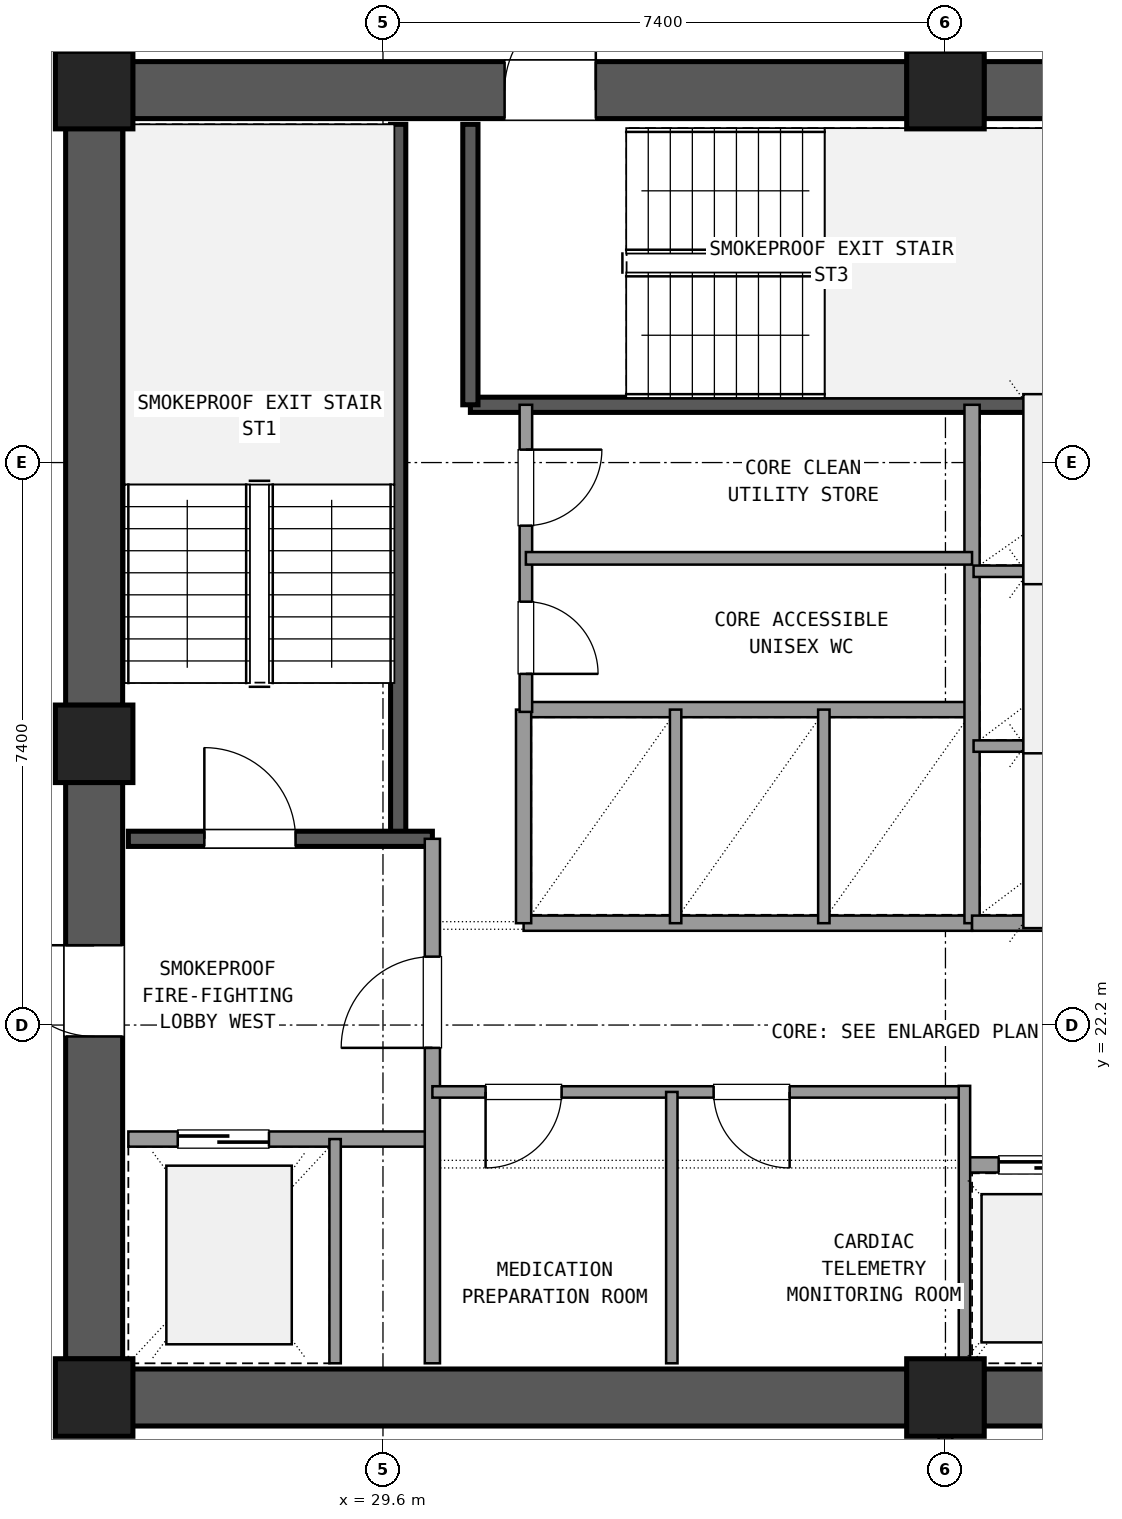
"""IFC4 building model, lengths in metres.
Left out: names, types, materials, properties, quantities, classifications, styles, units other than length and angle.
Written with IfcOpenShell. Run it as: python <this file> out.ifc"""

import sys

from ifc_helpers import new_model, si_unit, direction, frame, frame_2d, origin, origin_2d, place, context, subcontext, project, spatial, rectangle, extrude, element, fill, save


model = new_model("IFC4")
c1 = context("Model", 3, precision=1e-05, world=origin(), true_north=direction((0.0, 1.0)))
c2 = subcontext(c1, "Body", "Model", "MODEL_VIEW")
j1 = project(units=[si_unit("LENGTHUNIT", "METRE"), si_unit("PLANEANGLEUNIT", "RADIAN")], contexts=[c1])
p1 = place(None, origin())
s1 = spatial("IfcSite", under=j1, at=p1, CompositionType="ELEMENT")
p2 = place(p1, origin())
s2 = spatial("IfcBuilding", under=s1, at=p2, CompositionType="ELEMENT")
p3 = place(p2, frame((0.0, 0.0, 102.78)))
s3 = spatial("IfcBuildingStorey", under=s2, at=p3, CompositionType="ELEMENT", Elevation=102.78)
for number, where, z_axis, x_axis in (
    (1, (25.8, 17.3, 0.0), (0.0, 0.0, 1.0), (1.0, 0.0, 0.0)),
    (2, (37.0, 17.3, 0.0), (0.0, 0.0, 1.0), (1.0, 0.0, 0.0)),
    (3, (37.0, 34.5, 0.0), (0.0, 0.0, 1.0), (1.0, 0.0, 0.0)),
    (4, (25.8, 34.5, 0.0), (0.0, 0.0, 1.0), (1.0, 0.0, 0.0)),
    (5, (25.8, 25.9, 0.0), (0.0, 0.0, 1.0), (1.0, 0.0, 0.0)),
):
    element("IfcColumn", number, at=place(p3, frame(where, z_axis=z_axis, x_axis=x_axis)), inside=s3, PredefinedType="COLUMN", context=c2, shape_type="SweptSolid", body=[
        extrude(rectangle(XDim=1.02, YDim=1.02, at=origin_2d()), origin(), (0.0, 0.0, 1.0), 3.6),
    ])
for number, where, z_axis, x_axis in (
    (6, (26.305, 17.3, 0.0), (0.0, 0.0, 1.0), (1.0, 0.0, 0.0)),
    (7, (37.505, 17.3, 0.0), (0.0, 0.0, 1.0), (1.0, 0.0, 0.0)),
):
    element("IfcWall", number, at=place(p3, frame(where, z_axis=z_axis, x_axis=x_axis)), inside=s3, PredefinedType="SHEAR", context=c2, shape_type="SweptSolid", body=[
        extrude(rectangle(XDim=10.19, YDim=0.75, at=frame_2d((5.095, 0.0))), origin(), (0.0, 0.0, 1.0), 3.32),
    ])
p4 = place(p3, frame((47.695, 34.5, 0.0), z_axis=(0.0, 0.0, 1.0), x_axis=(-1.0, 0.0, 0.0)))
e8 = element("IfcWall", 8, at=p4, inside=s3, PredefinedType="SHEAR", context=c2, shape_type="SweptSolid", body=[
    extrude(rectangle(XDim=10.19, YDim=0.75, at=frame_2d((5.095, 0.0))), origin(), (0.0, 0.0, 1.0), 3.32),
])
p5 = place(p4, frame((4.595, 0.0, 0.0)))
e9 = element("IfcOpeningElement", 9, at=p5, cuts=e8, PredefinedType="OPENING", context=c2, shape_type="SweptSolid", body=[
    extrude(rectangle(XDim=1.6, YDim=2.2, at=frame_2d((0.8, 1.1))), frame((0.0, 0.385, 0.0), z_axis=(0.0, -1.0, 0.0), x_axis=(1.0, 0.0, 0.0)), (0.0, 0.0, 1.0), 0.77),
])
p6 = place(p3, frame((36.495, 34.5, 0.0), z_axis=(0.0, 0.0, 1.0), x_axis=(-1.0, 0.0, 0.0)))
e10 = element("IfcWall", 10, at=p6, inside=s3, PredefinedType="SHEAR", context=c2, shape_type="SweptSolid", body=[
    extrude(rectangle(XDim=10.19, YDim=0.75, at=frame_2d((5.095, 0.0))), origin(), (0.0, 0.0, 1.0), 3.32),
])
p7 = place(p6, frame((4.095, 0.0, 0.0)))
e11 = element("IfcOpeningElement", 11, at=p7, cuts=e10, PredefinedType="OPENING", context=c2, shape_type="SweptSolid", body=[
    extrude(rectangle(XDim=1.2, YDim=2.15, at=frame_2d((0.6, 1.075))), frame((0.0, 0.385, 0.0), z_axis=(0.0, -1.0, 0.0), x_axis=(1.0, 0.0, 0.0)), (0.0, 0.0, 1.0), 0.77),
])
p8 = place(p3, frame((25.8, 33.995, 0.0), z_axis=(0.0, 0.0, 1.0), x_axis=(0.0, -1.0, 0.0)))
e12 = element("IfcWall", 12, at=p8, inside=s3, PredefinedType="SHEAR", context=c2, shape_type="SweptSolid", body=[
    extrude(rectangle(XDim=7.59, YDim=0.75, at=frame_2d((3.795, 0.0))), origin(), (0.0, 0.0, 1.0), 3.32),
])
p9 = place(p3, frame((25.8, 25.395, 0.0), z_axis=(0.0, 0.0, 1.0), x_axis=(0.0, -1.0, 0.0)))
e13 = element("IfcWall", 13, at=p9, inside=s3, PredefinedType="SHEAR", context=c2, shape_type="SweptSolid", body=[
    extrude(rectangle(XDim=7.59, YDim=0.75, at=frame_2d((3.795, 0.0))), origin(), (0.0, 0.0, 1.0), 3.32),
])
p10 = place(p9, frame((2.145, 0.0, 0.0)))
e14 = element("IfcOpeningElement", 14, at=p10, cuts=e13, PredefinedType="OPENING", context=c2, shape_type="SweptSolid", body=[
    extrude(rectangle(XDim=1.2, YDim=2.15, at=frame_2d((0.6, 1.075))), frame((0.0, 0.385, 0.0), z_axis=(0.0, -1.0, 0.0), x_axis=(1.0, 0.0, 0.0)), (0.0, 0.0, 1.0), 0.77),
])
p11 = place(p3, frame((29.8, 24.65, 0.0), z_axis=(0.0, 0.0, 1.0), x_axis=(0.0, 1.0, 0.0)))
e15 = element("IfcWall", 15, at=p11, inside=s3, PredefinedType="SHEAR", context=c2, shape_type="SweptSolid", body=[
    extrude(rectangle(XDim=9.4, YDim=0.2, at=frame_2d((4.7, 0.0))), origin(), (0.0, 0.0, 1.0), 3.32),
])
p12 = place(p3, frame((26.25, 24.65, 0.0), z_axis=(0.0, 0.0, 1.0), x_axis=(1.0, 0.0, 0.0)))
e16 = element("IfcWall", 16, at=p12, inside=s3, PredefinedType="SHEAR", context=c2, shape_type="SweptSolid", body=[
    extrude(rectangle(XDim=4.0, YDim=0.2, at=frame_2d((2.0, 0.0))), origin(), (0.0, 0.0, 1.0), 3.32),
])
p13 = place(p12, frame((1.0, 0.0, 0.0)))
e17 = element("IfcOpeningElement", 17, at=p13, cuts=e16, PredefinedType="OPENING", context=c2, shape_type="SweptSolid", body=[
    extrude(rectangle(XDim=1.2, YDim=2.15, at=frame_2d((0.6, 1.075))), frame((0.0, 0.11, 0.0), z_axis=(0.0, -1.0, 0.0), x_axis=(1.0, 0.0, 0.0)), (0.0, 0.0, 1.0), 0.22),
])
p14 = place(p3, frame((30.75, 30.36, 0.0), z_axis=(0.0, 0.0, 1.0), x_axis=(1.0, 0.0, 0.0)))
e18 = element("IfcWall", 18, at=p14, inside=s3, PredefinedType="SHEAR", context=c2, shape_type="SweptSolid", body=[
    extrude(rectangle(XDim=9.5, YDim=0.2, at=frame_2d((4.75, 0.0))), origin(), (0.0, 0.0, 1.0), 3.32),
])
p15 = place(p3, frame((30.75, 30.36, 0.0), z_axis=(0.0, 0.0, 1.0), x_axis=(0.0, 1.0, 0.0)))
e19 = element("IfcWall", 19, at=p15, inside=s3, PredefinedType="SHEAR", context=c2, shape_type="SweptSolid", body=[
    extrude(rectangle(XDim=3.69, YDim=0.2, at=frame_2d((1.845, 0.0))), origin(), (0.0, 0.0, 1.0), 3.32),
])
p16 = place(p3, frame((26.25, 20.7, 0.0), z_axis=(0.0, 0.0, 1.0), x_axis=(1.0, 0.0, 0.0)))
e20 = element("IfcWall", 20, at=p16, inside=s3, PredefinedType="SOLIDWALL", context=c2, shape_type="SweptSolid", body=[
    extrude(rectangle(XDim=4.0, YDim=0.2, at=frame_2d((2.0, 0.0))), origin(), (0.0, 0.0, 1.0), 2.61),
])
p17 = place(p16, frame((0.65, 0.0, 0.0)))
e21 = element("IfcOpeningElement", 21, at=p17, cuts=e20, PredefinedType="OPENING", context=c2, shape_type="SweptSolid", body=[
    extrude(rectangle(XDim=1.2, YDim=2.15, at=frame_2d((0.6, 1.075))), frame((0.0, 0.11, 0.0), z_axis=(0.0, -1.0, 0.0), x_axis=(1.0, 0.0, 0.0)), (0.0, 0.0, 1.0), 0.22),
])
p18 = place(p3, frame((30.25, 17.75, 0.0), z_axis=(0.0, 0.0, 1.0), x_axis=(0.0, 1.0, 0.0)))
e22 = element("IfcWall", 22, at=p18, inside=s3, PredefinedType="SOLIDWALL", context=c2, shape_type="SweptSolid", body=[
    extrude(rectangle(XDim=6.9, YDim=0.2, at=frame_2d((3.45, 0.0))), origin(), (0.0, 0.0, 1.0), 2.61),
])
p19 = place(p18, frame((4.15, 0.0, 0.0)))
e23 = element("IfcOpeningElement", 23, at=p19, cuts=e22, PredefinedType="OPENING", context=c2, shape_type="SweptSolid", body=[
    extrude(rectangle(XDim=1.2, YDim=2.15, at=frame_2d((0.6, 1.075))), frame((0.0, 0.11, 0.0), z_axis=(0.0, -1.0, 0.0), x_axis=(1.0, 0.0, 0.0)), (0.0, 0.0, 1.0), 0.22),
])
p20 = place(p3, frame((28.97, 17.75, 0.0), z_axis=(0.0, 0.0, 1.0), x_axis=(0.0, 1.0, 0.0)))
e24 = element("IfcWall", 24, at=p20, inside=s3, PredefinedType="PARTITIONING", context=c2, shape_type="SweptSolid", body=[
    extrude(rectangle(XDim=2.95, YDim=0.15, at=frame_2d((1.475, 0.0))), origin(), (0.0, 0.0, 1.0), 2.61),
])
p21 = place(p3, frame((30.25, 21.32, 0.0), z_axis=(0.0, 0.0, 1.0), x_axis=(1.0, 0.0, 0.0)))
e25 = element("IfcWall", 25, at=p21, inside=s3, PredefinedType="PARTITIONING", context=c2, shape_type="SweptSolid", body=[
    extrude(rectangle(XDim=7.0, YDim=0.15, at=frame_2d((3.5, 0.0))), origin(), (0.0, 0.0, 1.0), 2.61),
])
p22 = place(p21, frame((0.7, 0.0, 0.0)))
e26 = element("IfcOpeningElement", 26, at=p22, cuts=e25, PredefinedType="OPENING", context=c2, shape_type="SweptSolid", body=[
    extrude(rectangle(XDim=1.0, YDim=2.15, at=frame_2d((0.5, 1.075))), frame((0.0, 0.085, 0.0), z_axis=(0.0, -1.0, 0.0), x_axis=(1.0, 0.0, 0.0)), (0.0, 0.0, 1.0), 0.17),
])
p23 = place(p21, frame((3.7, 0.0, 0.0)))
e27 = element("IfcOpeningElement", 27, at=p23, cuts=e25, PredefinedType="OPENING", context=c2, shape_type="SweptSolid", body=[
    extrude(rectangle(XDim=1.0, YDim=2.15, at=frame_2d((0.5, 1.075))), frame((0.0, 0.085, 0.0), z_axis=(0.0, -1.0, 0.0), x_axis=(1.0, 0.0, 0.0)), (0.0, 0.0, 1.0), 0.17),
])
p24 = place(p3, frame((33.4, 17.75, 0.0), z_axis=(0.0, 0.0, 1.0), x_axis=(0.0, 1.0, 0.0)))
e28 = element("IfcWall", 28, at=p24, inside=s3, PredefinedType="PARTITIONING", context=c2, shape_type="SweptSolid", body=[
    extrude(rectangle(XDim=3.57, YDim=0.15, at=frame_2d((1.785, 0.0))), origin(), (0.0, 0.0, 1.0), 2.61),
])
p25 = place(p3, frame((37.25, 20.36, 0.0), z_axis=(0.0, 0.0, 1.0), x_axis=(1.0, 0.0, 0.0)))
e29 = element("IfcWall", 29, at=p25, inside=s3, PredefinedType="SOLIDWALL", context=c2, shape_type="SweptSolid", body=[
    extrude(rectangle(XDim=6.1, YDim=0.2, at=frame_2d((3.05, 0.0))), origin(), (0.0, 0.0, 1.0), 2.61),
])
p26 = place(p25, frame((0.45, 0.0, 0.0)))
e30 = element("IfcOpeningElement", 30, at=p26, cuts=e29, PredefinedType="OPENING", context=c2, shape_type="SweptSolid", body=[
    extrude(rectangle(XDim=1.1, YDim=2.15, at=frame_2d((0.55, 1.075))), frame((0.0, 0.11, 0.0), z_axis=(0.0, -1.0, 0.0), x_axis=(1.0, 0.0, 0.0)), (0.0, 0.0, 1.0), 0.22),
])
p27 = place(p25, frame((2.5, 0.0, 0.0)))
e31 = element("IfcOpeningElement", 31, at=p27, cuts=e29, PredefinedType="OPENING", context=c2, shape_type="SweptSolid", body=[
    extrude(rectangle(XDim=1.1, YDim=2.15, at=frame_2d((0.55, 1.075))), frame((0.0, 0.11, 0.0), z_axis=(0.0, -1.0, 0.0), x_axis=(1.0, 0.0, 0.0)), (0.0, 0.0, 1.0), 0.22),
])
p28 = place(p25, frame((4.55, 0.0, 0.0)))
e32 = element("IfcOpeningElement", 32, at=p28, cuts=e29, PredefinedType="OPENING", context=c2, shape_type="SweptSolid", body=[
    extrude(rectangle(XDim=1.1, YDim=2.15, at=frame_2d((0.55, 1.075))), frame((0.0, 0.11, 0.0), z_axis=(0.0, -1.0, 0.0), x_axis=(1.0, 0.0, 0.0)), (0.0, 0.0, 1.0), 0.22),
])
p29 = place(p3, frame((37.25, 17.75, 0.0), z_axis=(0.0, 0.0, 1.0), x_axis=(0.0, 1.0, 0.0)))
e33 = element("IfcWall", 33, at=p29, inside=s3, PredefinedType="PARTITIONING", context=c2, shape_type="SweptSolid", body=[
    extrude(rectangle(XDim=3.65, YDim=0.15, at=frame_2d((1.825, 0.0))), origin(), (0.0, 0.0, 1.0), 2.61),
])
for number, where, z_axis, x_axis in (
    (34, (31.45, 23.54, 0.0), (0.0, 0.0, 1.0), (1.0, 0.0, 0.0)),
    (35, (31.45, 26.35, 0.0), (0.0, 0.0, 1.0), (1.0, 0.0, 0.0)),
):
    element("IfcWall", number, at=place(p3, frame(where, z_axis=z_axis, x_axis=x_axis)), inside=s3, PredefinedType="SOLIDWALL", context=c2, shape_type="SweptSolid", body=[
        extrude(rectangle(XDim=5.9, YDim=0.2, at=frame_2d((2.95, 0.0))), origin(), (0.0, 0.0, 1.0), 2.61),
    ])
p30 = place(p3, frame((31.45, 23.54, 0.0), z_axis=(0.0, 0.0, 1.0), x_axis=(0.0, 1.0, 0.0)))
e36 = element("IfcWall", 36, at=p30, inside=s3, PredefinedType="SOLIDWALL", context=c2, shape_type="SweptSolid", body=[
    extrude(rectangle(XDim=2.81, YDim=0.2, at=frame_2d((1.405, 0.0))), origin(), (0.0, 0.0, 1.0), 2.61),
])
for number, where, z_axis, x_axis in (
    (37, (33.45, 23.54, 0.0), (0.0, 0.0, 1.0), (0.0, 1.0, 0.0)),
    (38, (35.4, 23.54, 0.0), (0.0, 0.0, 1.0), (0.0, 1.0, 0.0)),
):
    element("IfcWall", number, at=place(p3, frame(where, z_axis=z_axis, x_axis=x_axis)), inside=s3, PredefinedType="PARTITIONING", context=c2, shape_type="SweptSolid", body=[
        extrude(rectangle(XDim=2.81, YDim=0.15, at=frame_2d((1.405, 0.0))), origin(), (0.0, 0.0, 1.0), 2.61),
    ])
p31 = place(p3, frame((37.35, 23.54, 0.0), z_axis=(0.0, 0.0, 1.0), x_axis=(0.0, 1.0, 0.0)))
e39 = element("IfcWall", 39, at=p31, inside=s3, PredefinedType="SOLIDWALL", context=c2, shape_type="SweptSolid", body=[
    extrude(rectangle(XDim=6.82, YDim=0.2, at=frame_2d((3.41, 0.0))), origin(), (0.0, 0.0, 1.0), 2.61),
])
p32 = place(p3, frame((37.35, 23.54, 0.0), z_axis=(0.0, 0.0, 1.0), x_axis=(1.0, 0.0, 0.0)))
e40 = element("IfcWall", 40, at=p32, inside=s3, PredefinedType="SOLIDWALL", context=c2, shape_type="SweptSolid", body=[
    extrude(rectangle(XDim=3.05, YDim=0.2, at=frame_2d((1.525, 0.0))), origin(), (0.0, 0.0, 1.0), 2.61),
])
for number, where, z_axis, x_axis in (
    (41, (37.37, 25.87, 0.0), (0.0, 0.0, 1.0), (1.0, 0.0, 0.0)),
    (42, (37.37, 28.17, 0.0), (0.0, 0.0, 1.0), (1.0, 0.0, 0.0)),
):
    element("IfcWall", number, at=place(p3, frame(where, z_axis=z_axis, x_axis=x_axis)), inside=s3, PredefinedType="PARTITIONING", context=c2, shape_type="SweptSolid", body=[
        extrude(rectangle(XDim=3.01, YDim=0.15, at=frame_2d((1.505, 0.0))), origin(), (0.0, 0.0, 1.0), 2.61),
    ])
p33 = place(p3, frame((31.48, 26.32, 0.0), z_axis=(0.0, 0.0, 1.0), x_axis=(0.0, 1.0, 0.0)))
e43 = element("IfcWall", 43, at=p33, inside=s3, PredefinedType="PLUMBINGWALL", context=c2, shape_type="SweptSolid", body=[
    extrude(rectangle(XDim=4.04, YDim=0.165, at=frame_2d((2.02, 0.0))), origin(), (0.0, 0.0, 1.0), 2.61),
])
p34 = place(p33, frame((0.5, 0.0, 0.0)))
e44 = element("IfcOpeningElement", 44, at=p34, cuts=e43, PredefinedType="OPENING", context=c2, shape_type="SweptSolid", body=[
    extrude(rectangle(XDim=0.95, YDim=2.1, at=frame_2d((0.475, 1.05))), frame((0.0, 0.093, 0.0), z_axis=(0.0, -1.0, 0.0), x_axis=(1.0, 0.0, 0.0)), (0.0, 0.0, 1.0), 0.185),
])
p35 = place(p33, frame((2.45, 0.0, 0.0)))
e45 = element("IfcOpeningElement", 45, at=p35, cuts=e43, PredefinedType="OPENING", context=c2, shape_type="SweptSolid", body=[
    extrude(rectangle(XDim=1.0, YDim=2.15, at=frame_2d((0.5, 1.075))), frame((0.0, 0.093, 0.0), z_axis=(0.0, -1.0, 0.0), x_axis=(1.0, 0.0, 0.0)), (0.0, 0.0, 1.0), 0.185),
])
p36 = place(p3, frame((31.48, 28.34, 0.0), z_axis=(0.0, 0.0, 1.0), x_axis=(1.0, 0.0, 0.0)))
e46 = element("IfcWall", 46, at=p36, inside=s3, PredefinedType="PLUMBINGWALL", context=c2, shape_type="SweptSolid", body=[
    extrude(rectangle(XDim=5.87, YDim=0.165, at=frame_2d((2.935, 0.0))), origin(), (0.0, 0.0, 1.0), 2.61),
])
p37 = place(p3, frame((37.0, 34.95, 0.0), z_axis=(0.0, 0.0, 1.0), x_axis=(0.0, 1.0, 0.0)))
e47 = element("IfcWall", 47, at=p37, inside=s3, PredefinedType="PARTITIONING", context=c2, shape_type="SweptSolid", body=[
    extrude(rectangle(XDim=3.21, YDim=0.18, at=frame_2d((1.605, 0.0))), origin(), (0.0, 0.0, 1.0), 2.61),
])
p38 = place(p37, frame((0.605, 0.0, 0.0)))
e48 = element("IfcOpeningElement", 48, at=p38, cuts=e47, PredefinedType="OPENING", context=c2, shape_type="SweptSolid", body=[
    extrude(rectangle(XDim=2.0, YDim=2.2, at=frame_2d((1.0, 1.1))), frame((0.0, 0.1, 0.0), z_axis=(0.0, -1.0, 0.0), x_axis=(1.0, 0.0, 0.0)), (0.0, 0.0, 1.0), 0.2),
])
p39 = place(p3, frame((37.0, 13.64, 0.0), z_axis=(0.0, 0.0, 1.0), x_axis=(0.0, 1.0, 0.0)))
e49 = element("IfcWall", 49, at=p39, inside=s3, PredefinedType="PARTITIONING", context=c2, shape_type="SweptSolid", body=[
    extrude(rectangle(XDim=3.21, YDim=0.18, at=frame_2d((1.605, 0.0))), origin(), (0.0, 0.0, 1.0), 2.61),
])
p40 = place(p39, frame((0.605, 0.0, 0.0)))
e50 = element("IfcOpeningElement", 50, at=p40, cuts=e49, PredefinedType="OPENING", context=c2, shape_type="SweptSolid", body=[
    extrude(rectangle(XDim=2.0, YDim=2.2, at=frame_2d((1.0, 1.1))), frame((0.0, 0.1, 0.0), z_axis=(0.0, -1.0, 0.0), x_axis=(1.0, 0.0, 0.0)), (0.0, 0.0, 1.0), 0.2),
])
p41 = place(p13, origin())
e51 = element("IfcDoor", 51, at=p41, inside=s3, OperationType="SINGLE_SWING_LEFT", PredefinedType="DOOR", context=c2, shape_type="SweptSolid", body=[
    extrude(rectangle(XDim=1.2, YDim=2.15, at=frame_2d((0.6, 1.075))), frame((0.0, 0.025, 0.0), z_axis=(0.0, -1.0, 0.0), x_axis=(1.0, 0.0, 0.0)), (0.0, 0.0, 1.0), 0.05),
])
fill(e17, e51)
p42 = place(p17, origin())
e52 = element("IfcDoor", 52, at=p42, inside=s3, OperationType="SLIDING_TO_LEFT", PredefinedType="DOOR", context=c2, shape_type="SweptSolid", body=[
    extrude(rectangle(XDim=1.2, YDim=2.15, at=frame_2d((0.6, 1.075))), frame((0.0, 0.025, 0.0), z_axis=(0.0, -1.0, 0.0), x_axis=(1.0, 0.0, 0.0)), (0.0, 0.0, 1.0), 0.05),
])
fill(e21, e52)
p43 = place(p19, origin())
e53 = element("IfcDoor", 53, at=p43, inside=s3, OperationType="SINGLE_SWING_LEFT", PredefinedType="DOOR", context=c2, shape_type="SweptSolid", body=[
    extrude(rectangle(XDim=1.2, YDim=2.15, at=frame_2d((0.6, 1.075))), frame((0.0, 0.025, 0.0), z_axis=(0.0, -1.0, 0.0), x_axis=(1.0, 0.0, 0.0)), (0.0, 0.0, 1.0), 0.05),
])
fill(e23, e53)
p44 = place(p10, frame((1.2, 0.0, 0.0), z_axis=(0.0, 0.0, 1.0), x_axis=(-1.0, 0.0, 0.0)))
e54 = element("IfcDoor", 54, at=p44, inside=s3, OperationType="SINGLE_SWING_LEFT", PredefinedType="DOOR", context=c2, shape_type="SweptSolid", body=[
    extrude(rectangle(XDim=1.2, YDim=2.15, at=frame_2d((0.6, 1.075))), frame((0.0, 0.025, 0.0), z_axis=(0.0, -1.0, 0.0), x_axis=(1.0, 0.0, 0.0)), (0.0, 0.0, 1.0), 0.05),
])
fill(e14, e54)
p45 = place(p7, frame((1.2, 0.0, 0.0), z_axis=(0.0, 0.0, 1.0), x_axis=(-1.0, 0.0, 0.0)))
e55 = element("IfcDoor", 55, at=p45, inside=s3, OperationType="SINGLE_SWING_LEFT", PredefinedType="DOOR", context=c2, shape_type="SweptSolid", body=[
    extrude(rectangle(XDim=1.2, YDim=2.15, at=frame_2d((0.6, 1.075))), frame((0.0, 0.025, 0.0), z_axis=(0.0, -1.0, 0.0), x_axis=(1.0, 0.0, 0.0)), (0.0, 0.0, 1.0), 0.05),
])
fill(e11, e55)
p46 = place(p22, frame((1.0, 0.0, 0.0), z_axis=(0.0, 0.0, 1.0), x_axis=(-1.0, 0.0, 0.0)))
e56 = element("IfcDoor", 56, at=p46, inside=s3, OperationType="SINGLE_SWING_LEFT", PredefinedType="DOOR", context=c2, shape_type="SweptSolid", body=[
    extrude(rectangle(XDim=1.0, YDim=2.15, at=frame_2d((0.5, 1.075))), frame((0.0, 0.025, 0.0), z_axis=(0.0, -1.0, 0.0), x_axis=(1.0, 0.0, 0.0)), (0.0, 0.0, 1.0), 0.05),
])
fill(e26, e56)
p47 = place(p23, frame((1.0, 0.0, 0.0), z_axis=(0.0, 0.0, 1.0), x_axis=(-1.0, 0.0, 0.0)))
e57 = element("IfcDoor", 57, at=p47, inside=s3, OperationType="SINGLE_SWING_RIGHT", PredefinedType="DOOR", context=c2, shape_type="SweptSolid", body=[
    extrude(rectangle(XDim=1.0, YDim=2.15, at=frame_2d((0.5, 1.075))), frame((0.0, 0.025, 0.0), z_axis=(0.0, -1.0, 0.0), x_axis=(1.0, 0.0, 0.0)), (0.0, 0.0, 1.0), 0.05),
])
fill(e27, e57)
p48 = place(p26, origin())
e58 = element("IfcDoor", 58, at=p48, inside=s3, OperationType="SLIDING_TO_LEFT", PredefinedType="DOOR", context=c2, shape_type="SweptSolid", body=[
    extrude(rectangle(XDim=1.1, YDim=2.15, at=frame_2d((0.55, 1.075))), frame((0.0, 0.025, 0.0), z_axis=(0.0, -1.0, 0.0), x_axis=(1.0, 0.0, 0.0)), (0.0, 0.0, 1.0), 0.05),
])
fill(e30, e58)
p49 = place(p34, frame((0.95, 0.0, 0.0), z_axis=(0.0, 0.0, 1.0), x_axis=(-1.0, 0.0, 0.0)))
e59 = element("IfcDoor", 59, at=p49, inside=s3, OperationType="SINGLE_SWING_LEFT", PredefinedType="DOOR", context=c2, shape_type="SweptSolid", body=[
    extrude(rectangle(XDim=0.95, YDim=2.1, at=frame_2d((0.475, 1.05))), frame((0.0, 0.025, 0.0), z_axis=(0.0, -1.0, 0.0), x_axis=(1.0, 0.0, 0.0)), (0.0, 0.0, 1.0), 0.05),
])
fill(e44, e59)
p50 = place(p35, frame((1.0, 0.0, 0.0), z_axis=(0.0, 0.0, 1.0), x_axis=(-1.0, 0.0, 0.0)))
e60 = element("IfcDoor", 60, at=p50, inside=s3, OperationType="SINGLE_SWING_RIGHT", PredefinedType="DOOR", context=c2, shape_type="SweptSolid", body=[
    extrude(rectangle(XDim=1.0, YDim=2.15, at=frame_2d((0.5, 1.075))), frame((0.0, 0.025, 0.0), z_axis=(0.0, -1.0, 0.0), x_axis=(1.0, 0.0, 0.0)), (0.0, 0.0, 1.0), 0.05),
])
fill(e45, e60)
save(model, sys.argv[1])
